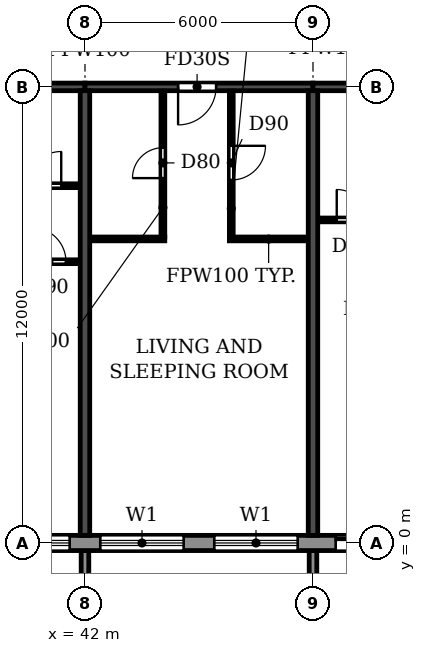
"""IFC4 building model, lengths in metres.
Left out: names, types, materials, properties, quantities, classifications, styles, units other than length and angle.
Written with IfcOpenShell. Run it as: python <this file> out.ifc"""

import sys

from ifc_helpers import new_model, si_unit, direction, frame, frame_2d, origin, place, context, subcontext, project, spatial, polyline, rectangle, outline, extrude, source, transform, mapped, element, fill, save


model = new_model("IFC4")
c1 = context("Model", 3, precision=1e-05, world=origin(), true_north=direction((0.0, 1.0)))
c2 = subcontext(c1, "Body", "Model", "MODEL_VIEW")
j1 = project(units=[si_unit("LENGTHUNIT", "METRE"), si_unit("PLANEANGLEUNIT", "RADIAN")], contexts=[c1])
p1 = place(None, origin())
s1 = spatial("IfcSite", under=j1, at=p1, CompositionType="ELEMENT")
p2 = place(p1, origin())
s2 = spatial("IfcBuilding", under=s1, at=p2, CompositionType="ELEMENT")
p3 = place(p2, frame((0.0, 0.0, 201.6)))
s3 = spatial("IfcBuildingStorey", under=s2, at=p3, CompositionType="ELEMENT", Elevation=201.6)
for number, where, z_axis, x_axis in (
    (1, (42.0, 0.2, 0.0), (0.0, 0.0, 1.0), (0.0, 1.0, 0.0)),
    (2, (48.0, 0.2, 0.0), (0.0, 0.0, 1.0), (0.0, 1.0, 0.0)),
):
    element("IfcWall", number, at=place(p3, frame(where, z_axis=z_axis, x_axis=x_axis)), inside=s3, PredefinedType="SHEAR", context=c2, shape_type="SweptSolid", body=[
        extrude(rectangle(XDim=11.7, YDim=0.25, at=frame_2d((5.85, 0.0))), origin(), (0.0, 0.0, 1.0), 3.08),
    ])
p4 = place(p3, frame((36.0, 12.0, 0.0), z_axis=(0.0, 0.0, 1.0), x_axis=(1.0, 0.0, 0.0)))
e3 = element("IfcWall", 3, at=p4, inside=s3, PredefinedType="SHEAR", context=c2, shape_type="SweptSolid", body=[
    extrude(rectangle(XDim=6.0, YDim=0.2, at=frame_2d((3.0, 0.0))), origin(), (0.0, 0.0, 1.0), 2.48),
])
p5 = place(p4, frame((2.45, 0.0, 0.0)))
e4 = element("IfcOpeningElement", 4, at=p5, cuts=e3, PredefinedType="OPENING", context=c2, shape_type="SweptSolid", body=[
    extrude(rectangle(XDim=1.0, YDim=2.1, at=frame_2d((0.5, 1.05))), frame((0.0, 0.11, 0.0), z_axis=(0.0, -1.0, 0.0), x_axis=(1.0, 0.0, 0.0)), (0.0, 0.0, 1.0), 0.22),
])
p6 = place(p3, frame((42.0, 12.0, 0.0), z_axis=(0.0, 0.0, 1.0), x_axis=(1.0, 0.0, 0.0)))
e5 = element("IfcWall", 5, at=p6, inside=s3, PredefinedType="SHEAR", context=c2, shape_type="SweptSolid", body=[
    extrude(rectangle(XDim=6.0, YDim=0.2, at=frame_2d((3.0, 0.0))), origin(), (0.0, 0.0, 1.0), 2.48),
])
p7 = place(p6, frame((2.45, 0.0, 0.0)))
e6 = element("IfcOpeningElement", 6, at=p7, cuts=e5, PredefinedType="OPENING", context=c2, shape_type="SweptSolid", body=[
    extrude(rectangle(XDim=1.0, YDim=2.1, at=frame_2d((0.5, 1.05))), frame((0.0, 0.11, 0.0), z_axis=(0.0, -1.0, 0.0), x_axis=(1.0, 0.0, 0.0)), (0.0, 0.0, 1.0), 0.22),
])
p8 = place(p3, frame((48.0, 12.0, 0.0), z_axis=(0.0, 0.0, 1.0), x_axis=(1.0, 0.0, 0.0)))
e7 = element("IfcWall", 7, at=p8, inside=s3, PredefinedType="SHEAR", context=c2, shape_type="SweptSolid", body=[
    extrude(rectangle(XDim=6.0, YDim=0.2, at=frame_2d((3.0, 0.0))), origin(), (0.0, 0.0, 1.0), 2.48),
])
p9 = place(p8, frame((2.45, 0.0, 0.0)))
e8 = element("IfcOpeningElement", 8, at=p9, cuts=e7, PredefinedType="OPENING", context=c2, shape_type="SweptSolid", body=[
    extrude(rectangle(XDim=1.0, YDim=2.1, at=frame_2d((0.5, 1.05))), frame((0.0, 0.11, 0.0), z_axis=(0.0, -1.0, 0.0), x_axis=(1.0, 0.0, 0.0)), (0.0, 0.0, 1.0), 0.22),
])
p10 = place(p3, frame((22.683, 0.0, 0.0), z_axis=(0.0, 0.0, 1.0), x_axis=(1.0, 0.0, 0.0)))
e9 = element("IfcWall", 9, at=p10, inside=s3, PredefinedType="STANDARD", context=c2, shape_type="SweptSolid", body=[
    extrude(rectangle(XDim=56.634, YDim=0.4, at=frame_2d((28.317, 0.0))), origin(), (0.0, 0.0, 1.0), 3.08),
])
p11 = place(p10, frame((1.917, 0.0, 0.0)))
e10 = element("IfcOpeningElement", 10, at=p11, cuts=e9, PredefinedType="OPENING", context=c2, shape_type="SweptSolid", body=[
    extrude(rectangle(XDim=1.8, YDim=2.4, at=frame_2d((0.9, 1.2))), frame((0.0, 0.21, 0.0), z_axis=(0.0, -1.0, 0.0), x_axis=(1.0, 0.0, 0.0)), (0.0, 0.0, 1.0), 0.42),
])
p12 = place(p10, frame((4.717, 0.0, 0.9)))
e11 = element("IfcOpeningElement", 11, at=p12, cuts=e9, PredefinedType="OPENING", context=c2, shape_type="SweptSolid", body=[
    extrude(rectangle(XDim=2.2, YDim=1.5, at=frame_2d((1.1, 0.75))), frame((0.0, 0.21, 0.0), z_axis=(0.0, -1.0, 0.0), x_axis=(1.0, 0.0, 0.0)), (0.0, 0.0, 1.0), 0.42),
])
p13 = place(p10, frame((7.717, 0.0, 0.9)))
e12 = element("IfcOpeningElement", 12, at=p13, cuts=e9, PredefinedType="OPENING", context=c2, shape_type="SweptSolid", body=[
    extrude(rectangle(XDim=2.2, YDim=1.5, at=frame_2d((1.1, 0.75))), frame((0.0, 0.21, 0.0), z_axis=(0.0, -1.0, 0.0), x_axis=(1.0, 0.0, 0.0)), (0.0, 0.0, 1.0), 0.42),
])
p14 = place(p10, frame((10.717, 0.0, 0.9)))
e13 = element("IfcOpeningElement", 13, at=p14, cuts=e9, PredefinedType="OPENING", context=c2, shape_type="SweptSolid", body=[
    extrude(rectangle(XDim=2.2, YDim=1.5, at=frame_2d((1.1, 0.75))), frame((0.0, 0.21, 0.0), z_axis=(0.0, -1.0, 0.0), x_axis=(1.0, 0.0, 0.0)), (0.0, 0.0, 1.0), 0.42),
])
p15 = place(p10, frame((13.917, 0.0, 0.0)))
e14 = element("IfcOpeningElement", 14, at=p15, cuts=e9, PredefinedType="OPENING", context=c2, shape_type="SweptSolid", body=[
    extrude(rectangle(XDim=1.8, YDim=2.4, at=frame_2d((0.9, 1.2))), frame((0.0, 0.21, 0.0), z_axis=(0.0, -1.0, 0.0), x_axis=(1.0, 0.0, 0.0)), (0.0, 0.0, 1.0), 0.42),
])
p16 = place(p10, frame((16.717, 0.0, 0.9)))
e15 = element("IfcOpeningElement", 15, at=p16, cuts=e9, PredefinedType="OPENING", context=c2, shape_type="SweptSolid", body=[
    extrude(rectangle(XDim=2.2, YDim=1.5, at=frame_2d((1.1, 0.75))), frame((0.0, 0.21, 0.0), z_axis=(0.0, -1.0, 0.0), x_axis=(1.0, 0.0, 0.0)), (0.0, 0.0, 1.0), 0.42),
])
p17 = place(p10, frame((19.717, 0.0, 0.9)))
e16 = element("IfcOpeningElement", 16, at=p17, cuts=e9, PredefinedType="OPENING", context=c2, shape_type="SweptSolid", body=[
    extrude(rectangle(XDim=2.2, YDim=1.5, at=frame_2d((1.1, 0.75))), frame((0.0, 0.21, 0.0), z_axis=(0.0, -1.0, 0.0), x_axis=(1.0, 0.0, 0.0)), (0.0, 0.0, 1.0), 0.42),
])
p18 = place(p10, frame((22.717, 0.0, 0.9)))
e17 = element("IfcOpeningElement", 17, at=p18, cuts=e9, PredefinedType="OPENING", context=c2, shape_type="SweptSolid", body=[
    extrude(rectangle(XDim=2.2, YDim=1.5, at=frame_2d((1.1, 0.75))), frame((0.0, 0.21, 0.0), z_axis=(0.0, -1.0, 0.0), x_axis=(1.0, 0.0, 0.0)), (0.0, 0.0, 1.0), 0.42),
])
p19 = place(p10, frame((25.917, 0.0, 0.0)))
e18 = element("IfcOpeningElement", 18, at=p19, cuts=e9, PredefinedType="OPENING", context=c2, shape_type="SweptSolid", body=[
    extrude(rectangle(XDim=1.8, YDim=2.4, at=frame_2d((0.9, 1.2))), frame((0.0, 0.21, 0.0), z_axis=(0.0, -1.0, 0.0), x_axis=(1.0, 0.0, 0.0)), (0.0, 0.0, 1.0), 0.42),
])
p20 = place(p10, frame((28.717, 0.0, 0.9)))
e19 = element("IfcOpeningElement", 19, at=p20, cuts=e9, PredefinedType="OPENING", context=c2, shape_type="SweptSolid", body=[
    extrude(rectangle(XDim=2.2, YDim=1.5, at=frame_2d((1.1, 0.75))), frame((0.0, 0.21, 0.0), z_axis=(0.0, -1.0, 0.0), x_axis=(1.0, 0.0, 0.0)), (0.0, 0.0, 1.0), 0.42),
])
p21 = place(p10, frame((31.717, 0.0, 0.9)))
e20 = element("IfcOpeningElement", 20, at=p21, cuts=e9, PredefinedType="OPENING", context=c2, shape_type="SweptSolid", body=[
    extrude(rectangle(XDim=2.2, YDim=1.5, at=frame_2d((1.1, 0.75))), frame((0.0, 0.21, 0.0), z_axis=(0.0, -1.0, 0.0), x_axis=(1.0, 0.0, 0.0)), (0.0, 0.0, 1.0), 0.42),
])
p22 = place(p10, frame((34.717, 0.0, 0.9)))
e21 = element("IfcOpeningElement", 21, at=p22, cuts=e9, PredefinedType="OPENING", context=c2, shape_type="SweptSolid", body=[
    extrude(rectangle(XDim=2.2, YDim=1.5, at=frame_2d((1.1, 0.75))), frame((0.0, 0.21, 0.0), z_axis=(0.0, -1.0, 0.0), x_axis=(1.0, 0.0, 0.0)), (0.0, 0.0, 1.0), 0.42),
])
p23 = place(p10, frame((37.717, 0.0, 0.9)))
e22 = element("IfcOpeningElement", 22, at=p23, cuts=e9, PredefinedType="OPENING", context=c2, shape_type="SweptSolid", body=[
    extrude(rectangle(XDim=2.2, YDim=1.5, at=frame_2d((1.1, 0.75))), frame((0.0, 0.21, 0.0), z_axis=(0.0, -1.0, 0.0), x_axis=(1.0, 0.0, 0.0)), (0.0, 0.0, 1.0), 0.42),
])
p24 = place(p10, frame((40.717, 0.0, 0.9)))
e23 = element("IfcOpeningElement", 23, at=p24, cuts=e9, PredefinedType="OPENING", context=c2, shape_type="SweptSolid", body=[
    extrude(rectangle(XDim=2.2, YDim=1.5, at=frame_2d((1.1, 0.75))), frame((0.0, 0.21, 0.0), z_axis=(0.0, -1.0, 0.0), x_axis=(1.0, 0.0, 0.0)), (0.0, 0.0, 1.0), 0.42),
])
p25 = place(p10, frame((43.717, 0.0, 0.9)))
e24 = element("IfcOpeningElement", 24, at=p25, cuts=e9, PredefinedType="OPENING", context=c2, shape_type="SweptSolid", body=[
    extrude(rectangle(XDim=2.2, YDim=1.5, at=frame_2d((1.1, 0.75))), frame((0.0, 0.21, 0.0), z_axis=(0.0, -1.0, 0.0), x_axis=(1.0, 0.0, 0.0)), (0.0, 0.0, 1.0), 0.42),
])
p26 = place(p10, frame((46.717, 0.0, 0.9)))
e25 = element("IfcOpeningElement", 25, at=p26, cuts=e9, PredefinedType="OPENING", context=c2, shape_type="SweptSolid", body=[
    extrude(rectangle(XDim=2.2, YDim=1.5, at=frame_2d((1.1, 0.75))), frame((0.0, 0.21, 0.0), z_axis=(0.0, -1.0, 0.0), x_axis=(1.0, 0.0, 0.0)), (0.0, 0.0, 1.0), 0.42),
])
p27 = place(p10, frame((49.717, 0.0, 0.9)))
e26 = element("IfcOpeningElement", 26, at=p27, cuts=e9, PredefinedType="OPENING", context=c2, shape_type="SweptSolid", body=[
    extrude(rectangle(XDim=2.2, YDim=1.5, at=frame_2d((1.1, 0.75))), frame((0.0, 0.21, 0.0), z_axis=(0.0, -1.0, 0.0), x_axis=(1.0, 0.0, 0.0)), (0.0, 0.0, 1.0), 0.42),
])
p28 = place(p10, frame((52.917, 0.0, 0.0)))
e27 = element("IfcOpeningElement", 27, at=p28, cuts=e9, PredefinedType="OPENING", context=c2, shape_type="SweptSolid", body=[
    extrude(rectangle(XDim=1.8, YDim=2.4, at=frame_2d((0.9, 1.2))), frame((0.0, 0.21, 0.0), z_axis=(0.0, -1.0, 0.0), x_axis=(1.0, 0.0, 0.0)), (0.0, 0.0, 1.0), 0.42),
])
m1 = source(origin(), c2, "Body", "SweptSolid", [
    extrude(outline(polyline([(0.0, 0.0), (0.2, 0.0), (0.2, 1.65), (0.0, 1.65), (0.0, 0.0)])), origin(), (0.0, 0.0, 1.0), 3.1),
])
for number, where in (
    (28, (41.9, -1.85, 0.0)),
    (29, (47.9, -1.85, 0.0)),
):
    element("IfcWall", number, at=place(p3, frame(where)), inside=s3, PredefinedType="STANDARD", context=c2, shape_type="MappedRepresentation", body=[
        mapped(m1, transform((0.0, 0.0, 0.0))),
    ])
p29 = place(p3, frame((38.95, 7.4, 0.0), z_axis=(0.0, 0.0, 1.0), x_axis=(1.0, 0.0, 0.0)))
e30 = element("IfcWall", 30, at=p29, inside=s3, PredefinedType="PARTITIONING", context=c2, shape_type="SweptSolid", body=[
    extrude(rectangle(XDim=2.915, YDim=0.1, at=frame_2d((1.458, 0.0))), origin(), (0.0, 0.0, 1.0), 3.08),
])
p30 = place(p29, frame((1.65, 0.0, 0.0)))
e31 = element("IfcOpeningElement", 31, at=p30, cuts=e30, PredefinedType="OPENING", context=c2, shape_type="SweptSolid", body=[
    extrude(rectangle(XDim=0.9, YDim=2.1, at=frame_2d((0.45, 1.05))), frame((0.0, 0.06, 0.0), z_axis=(0.0, -1.0, 0.0), x_axis=(1.0, 0.0, 0.0)), (0.0, 0.0, 1.0), 0.12),
])
p31 = place(p3, frame((42.135, 8.0, 0.0), z_axis=(0.0, 0.0, 1.0), x_axis=(1.0, 0.0, 0.0)))
e32 = element("IfcWall", 32, at=p31, inside=s3, PredefinedType="PARTITIONING", context=c2, shape_type="SweptSolid", body=[
    extrude(rectangle(XDim=1.965, YDim=0.1, at=frame_2d((0.982, 0.0))), origin(), (0.0, 0.0, 1.0), 3.08),
])
p32 = place(p3, frame((45.8, 8.0, 0.0), z_axis=(0.0, 0.0, 1.0), x_axis=(1.0, 0.0, 0.0)))
e33 = element("IfcWall", 33, at=p32, inside=s3, PredefinedType="PARTITIONING", context=c2, shape_type="SweptSolid", body=[
    extrude(rectangle(XDim=2.065, YDim=0.1, at=frame_2d((1.032, 0.0))), origin(), (0.0, 0.0, 1.0), 3.08),
])
p33 = place(p3, frame((48.135, 8.5, 0.0), z_axis=(0.0, 0.0, 1.0), x_axis=(1.0, 0.0, 0.0)))
e34 = element("IfcWall", 34, at=p33, inside=s3, PredefinedType="PARTITIONING", context=c2, shape_type="SweptSolid", body=[
    extrude(rectangle(XDim=1.965, YDim=0.1, at=frame_2d((0.982, 0.0))), origin(), (0.0, 0.0, 1.0), 3.08),
])
p34 = place(p33, frame((0.49, 0.0, 0.0)))
e35 = element("IfcOpeningElement", 35, at=p34, cuts=e34, PredefinedType="OPENING", context=c2, shape_type="SweptSolid", body=[
    extrude(rectangle(XDim=0.8, YDim=2.1, at=frame_2d((0.4, 1.05))), frame((0.0, 0.06, 0.0), z_axis=(0.0, -1.0, 0.0), x_axis=(1.0, 0.0, 0.0)), (0.0, 0.0, 1.0), 0.12),
])
p35 = place(p3, frame((39.8, 9.4, 0.0), z_axis=(0.0, 0.0, 1.0), x_axis=(1.0, 0.0, 0.0)))
e36 = element("IfcWall", 36, at=p35, inside=s3, PredefinedType="PARTITIONING", context=c2, shape_type="SweptSolid", body=[
    extrude(rectangle(XDim=2.065, YDim=0.1, at=frame_2d((1.032, 0.0))), origin(), (0.0, 0.0, 1.0), 3.08),
])
p36 = place(p35, frame((0.675, 0.0, 0.0)))
e37 = element("IfcOpeningElement", 37, at=p36, cuts=e36, PredefinedType="OPENING", context=c2, shape_type="SweptSolid", body=[
    extrude(rectangle(XDim=0.9, YDim=2.1, at=frame_2d((0.45, 1.05))), frame((0.0, 0.06, 0.0), z_axis=(0.0, -1.0, 0.0), x_axis=(1.0, 0.0, 0.0)), (0.0, 0.0, 1.0), 0.12),
])
p37 = place(p3, frame((44.05, 8.05, 0.0), z_axis=(0.0, 0.0, 1.0), x_axis=(0.0, 1.0, 0.0)))
e38 = element("IfcWall", 38, at=p37, inside=s3, PredefinedType="PARTITIONING", context=c2, shape_type="SweptSolid", body=[
    extrude(rectangle(XDim=3.84, YDim=0.1, at=frame_2d((1.92, 0.0))), origin(), (0.0, 0.0, 1.0), 3.08),
])
p38 = place(p37, frame((1.55, 0.0, 0.0)))
e39 = element("IfcOpeningElement", 39, at=p38, cuts=e38, PredefinedType="OPENING", context=c2, shape_type="SweptSolid", body=[
    extrude(rectangle(XDim=0.8, YDim=2.1, at=frame_2d((0.4, 1.05))), frame((0.0, 0.06, 0.0), z_axis=(0.0, -1.0, 0.0), x_axis=(1.0, 0.0, 0.0)), (0.0, 0.0, 1.0), 0.12),
])
p39 = place(p3, frame((45.85, 8.05, 0.0), z_axis=(0.0, 0.0, 1.0), x_axis=(0.0, 1.0, 0.0)))
e40 = element("IfcWall", 40, at=p39, inside=s3, PredefinedType="PARTITIONING", context=c2, shape_type="SweptSolid", body=[
    extrude(rectangle(XDim=3.84, YDim=0.1, at=frame_2d((1.92, 0.0))), origin(), (0.0, 0.0, 1.0), 3.08),
])
p40 = place(p39, frame((1.5, 0.0, 0.0)))
e41 = element("IfcOpeningElement", 41, at=p40, cuts=e40, PredefinedType="OPENING", context=c2, shape_type="SweptSolid", body=[
    extrude(rectangle(XDim=0.9, YDim=2.1, at=frame_2d((0.45, 1.05))), frame((0.0, 0.06, 0.0), z_axis=(0.0, -1.0, 0.0), x_axis=(1.0, 0.0, 0.0)), (0.0, 0.0, 1.0), 0.12),
])
p41 = place(p16, origin())
e42 = element("IfcWindow", 42, at=p41, inside=s3, PartitioningType="DOUBLE_PANEL_HORIZONTAL", PredefinedType="WINDOW", context=c2, shape_type="SweptSolid", body=[
    extrude(rectangle(XDim=2.2, YDim=1.5, at=frame_2d((1.1, 0.75))), frame((0.0, 0.03, 0.0), z_axis=(0.0, -1.0, 0.0), x_axis=(1.0, 0.0, 0.0)), (0.0, 0.0, 1.0), 0.06),
])
fill(e15, e42)
p42 = place(p17, origin())
e43 = element("IfcWindow", 43, at=p42, inside=s3, PartitioningType="DOUBLE_PANEL_HORIZONTAL", PredefinedType="WINDOW", context=c2, shape_type="SweptSolid", body=[
    extrude(rectangle(XDim=2.2, YDim=1.5, at=frame_2d((1.1, 0.75))), frame((0.0, 0.03, 0.0), z_axis=(0.0, -1.0, 0.0), x_axis=(1.0, 0.0, 0.0)), (0.0, 0.0, 1.0), 0.06),
])
fill(e16, e43)
p43 = place(p18, origin())
e44 = element("IfcWindow", 44, at=p43, inside=s3, PartitioningType="DOUBLE_PANEL_HORIZONTAL", PredefinedType="WINDOW", context=c2, shape_type="SweptSolid", body=[
    extrude(rectangle(XDim=2.2, YDim=1.5, at=frame_2d((1.1, 0.75))), frame((0.0, 0.03, 0.0), z_axis=(0.0, -1.0, 0.0), x_axis=(1.0, 0.0, 0.0)), (0.0, 0.0, 1.0), 0.06),
])
fill(e17, e44)
p44 = place(p19, origin())
e45 = element("IfcDoor", 45, at=p44, inside=s3, OperationType="DOUBLE_DOOR_SLIDING", PredefinedType="DOOR", context=c2, shape_type="SweptSolid", body=[
    extrude(rectangle(XDim=1.8, YDim=2.4, at=frame_2d((0.9, 1.2))), frame((0.0, 0.025, 0.0), z_axis=(0.0, -1.0, 0.0), x_axis=(1.0, 0.0, 0.0)), (0.0, 0.0, 1.0), 0.05),
])
fill(e18, e45)
p45 = place(p36, origin())
e46 = element("IfcDoor", 46, at=p45, inside=s3, OperationType="SINGLE_SWING_RIGHT", PredefinedType="DOOR", context=c2, shape_type="SweptSolid", body=[
    extrude(rectangle(XDim=0.9, YDim=2.1, at=frame_2d((0.45, 1.05))), frame((0.0, 0.025, 0.0), z_axis=(0.0, -1.0, 0.0), x_axis=(1.0, 0.0, 0.0)), (0.0, 0.0, 1.0), 0.05),
])
fill(e37, e46)
p46 = place(p30, origin())
e47 = element("IfcDoor", 47, at=p46, inside=s3, OperationType="SINGLE_SWING_LEFT", PredefinedType="DOOR", context=c2, shape_type="SweptSolid", body=[
    extrude(rectangle(XDim=0.9, YDim=2.1, at=frame_2d((0.45, 1.05))), frame((0.0, 0.025, 0.0), z_axis=(0.0, -1.0, 0.0), x_axis=(1.0, 0.0, 0.0)), (0.0, 0.0, 1.0), 0.05),
])
fill(e31, e47)
p47 = place(p38, origin())
e48 = element("IfcDoor", 48, at=p47, inside=s3, OperationType="SINGLE_SWING_LEFT", PredefinedType="DOOR", context=c2, shape_type="SweptSolid", body=[
    extrude(rectangle(XDim=0.8, YDim=2.1, at=frame_2d((0.4, 1.05))), frame((0.0, 0.025, 0.0), z_axis=(0.0, -1.0, 0.0), x_axis=(1.0, 0.0, 0.0)), (0.0, 0.0, 1.0), 0.05),
])
fill(e39, e48)
p48 = place(p7, frame((1.0, 0.0, 0.0), z_axis=(0.0, 0.0, 1.0), x_axis=(-1.0, 0.0, 0.0)))
e49 = element("IfcDoor", 49, at=p48, inside=s3, OperationType="SINGLE_SWING_RIGHT", PredefinedType="DOOR", context=c2, shape_type="SweptSolid", body=[
    extrude(rectangle(XDim=1.0, YDim=2.1, at=frame_2d((0.5, 1.05))), frame((0.0, 0.025, 0.0), z_axis=(0.0, -1.0, 0.0), x_axis=(1.0, 0.0, 0.0)), (0.0, 0.0, 1.0), 0.05),
])
fill(e6, e49)
p49 = place(p40, frame((0.9, 0.0, 0.0), z_axis=(0.0, 0.0, 1.0), x_axis=(-1.0, 0.0, 0.0)))
e50 = element("IfcDoor", 50, at=p49, inside=s3, OperationType="SINGLE_SWING_LEFT", PredefinedType="DOOR", context=c2, shape_type="SweptSolid", body=[
    extrude(rectangle(XDim=0.9, YDim=2.1, at=frame_2d((0.45, 1.05))), frame((0.0, 0.025, 0.0), z_axis=(0.0, -1.0, 0.0), x_axis=(1.0, 0.0, 0.0)), (0.0, 0.0, 1.0), 0.05),
])
fill(e41, e50)
p50 = place(p34, origin())
e51 = element("IfcDoor", 51, at=p50, inside=s3, OperationType="SINGLE_SWING_LEFT", PredefinedType="DOOR", context=c2, shape_type="SweptSolid", body=[
    extrude(rectangle(XDim=0.8, YDim=2.1, at=frame_2d((0.4, 1.05))), frame((0.0, 0.025, 0.0), z_axis=(0.0, -1.0, 0.0), x_axis=(1.0, 0.0, 0.0)), (0.0, 0.0, 1.0), 0.05),
])
fill(e35, e51)
save(model, sys.argv[1])
